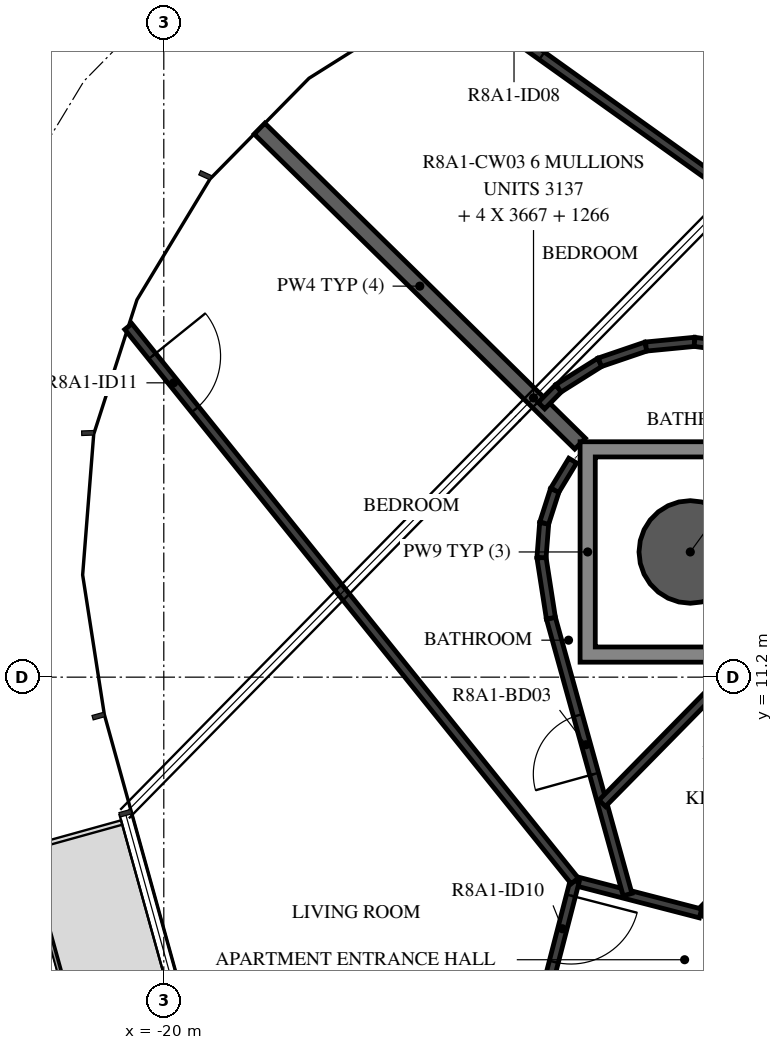
"""IFC4 building model, lengths in metres.
Left out: names, types, materials, properties, quantities, classifications, styles, units other than length and angle.
Written with IfcOpenShell. Run it as: python <this file> out.ifc"""

import sys

from ifc_helpers import new_model, si_unit, direction, frame, frame_2d, origin, origin_2d, place, context, subcontext, project, spatial, polyline, rectangle, hollow_circle, outline, extrude, element, fill, save


model = new_model("IFC4")
c1 = context("Model", 3, precision=1e-05, world=origin(), true_north=direction((0.0, 1.0)))
c2 = subcontext(c1, "Body", "Model", "MODEL_VIEW")
j1 = project(units=[si_unit("LENGTHUNIT", "METRE"), si_unit("PLANEANGLEUNIT", "RADIAN")], contexts=[c1])
p1 = place(None, origin())
s1 = spatial("IfcSite", under=j1, at=p1, CompositionType="ELEMENT")
p2 = place(p1, origin())
s2 = spatial("IfcBuilding", under=s1, at=p2, CompositionType="ELEMENT")
p3 = place(p2, frame((0.0, 0.0, 301.7)))
s3 = spatial("IfcBuildingStorey", under=s2, at=p3, CompositionType="ELEMENT", Elevation=301.7)
p4 = place(p3, frame((-13.073, 12.847, -0.38), z_axis=(0.0, 0.0, 1.0), x_axis=(1.0, 0.0, 0.0)))
e1 = element("IfcColumn", 1, at=p4, inside=s3, PredefinedType="COLUMN", context=c2, shape_type="SweptSolid", body=[
    extrude(hollow_circle(Radius=0.675, WallThickness=0.03, at=origin_2d()), origin(), (0.0, 0.0, 1.0), 3.5),
])
p5 = place(p3, frame((-18.741, 18.417, 0.0), z_axis=(0.0, 0.0, 1.0), x_axis=(0.713252414586, -0.700907264256, 0.0)))
e2 = element("IfcWall", 2, at=p5, inside=s3, PredefinedType="STANDARD", context=c2, shape_type="SweptSolid", body=[
    extrude(rectangle(XDim=5.913, YDim=0.2, at=frame_2d((2.957, 0.0))), origin(), (0.0, 0.0, 1.0), 3.12),
])
p6 = place(p3, frame((-7.974, 13.144, 0.0), z_axis=(0.0, 0.0, 1.0), x_axis=(-0.700910366085, -0.713249366432, 0.0)))
e3 = element("IfcWall", 3, at=p6, inside=s3, PredefinedType="PARTITIONING", context=c2, shape_type="SweptSolid", body=[
    extrude(rectangle(XDim=7.083, YDim=0.12, at=frame_2d((3.542, 0.0))), origin(), (0.0, 0.0, 1.0), 3.12),
])
p7 = place(p6, frame((3.986, 0.0, 0.0)))
e4 = element("IfcOpeningElement", 4, at=p7, cuts=e3, PredefinedType="OPENING", context=c2, shape_type="SweptSolid", body=[
    extrude(rectangle(XDim=0.9, YDim=2.1, at=frame_2d((0.45, 1.05))), frame((0.0, 0.07, 0.0), z_axis=(0.0, -1.0, 0.0), x_axis=(1.0, 0.0, 0.0)), (0.0, 0.0, 1.0), 0.14),
])
p8 = place(p3, frame((-16.165, 20.188, 0.0), z_axis=(0.0, 0.0, 1.0), x_axis=(0.813459166979, -0.581622028175, 0.0)))
e5 = element("IfcWall", 5, at=p8, inside=s3, PredefinedType="PARTITIONING", context=c2, shape_type="SweptSolid", body=[
    extrude(rectangle(XDim=9.565, YDim=0.12, at=frame_2d((4.782, 0.0))), origin(), (0.0, 0.0, 1.0), 3.12),
])
p9 = place(p8, frame((0.5, 0.0, 0.0)))
e6 = element("IfcOpeningElement", 6, at=p9, cuts=e5, PredefinedType="OPENING", context=c2, shape_type="SweptSolid", body=[
    extrude(rectangle(XDim=0.9, YDim=2.1, at=frame_2d((0.45, 1.05))), frame((0.0, 0.07, 0.0), z_axis=(0.0, -1.0, 0.0), x_axis=(1.0, 0.0, 0.0)), (0.0, 0.0, 1.0), 0.14),
])
p10 = place(p3, frame((-15.032, 14.772, 0.0), z_axis=(0.0, 0.0, 1.0), x_axis=(0.701378407906, 0.712789119532, 0.0)))
e7 = element("IfcWall", 7, at=p10, inside=s3, PredefinedType="PARTITIONING", context=c2, shape_type="SweptSolid", body=[
    extrude(rectangle(XDim=0.321, YDim=0.12, at=frame_2d((0.161, 0.0))), origin(), (0.0, 0.0, 1.0), 3.12),
])
p11 = place(p3, frame((-14.807, 15.0, 0.0), z_axis=(0.0, 0.0, 1.0), x_axis=(0.846499451836, 0.532389592349, 0.0)))
e8 = element("IfcWall", 8, at=p11, inside=s3, PredefinedType="PARTITIONING", context=c2, shape_type="SweptSolid", body=[
    extrude(rectangle(XDim=0.642, YDim=0.12, at=frame_2d((0.321, 0.0))), origin(), (0.0, 0.0, 1.0), 3.12),
])
for number, where, z_axis, x_axis in (
    (9, (-14.263, 15.342, 0.0), (0.0, 0.0, 1.0), (0.946, 0.323, 0.0)),
    (10, (-13.656, 15.55, 0.0), (0.0, 0.0, 1.0), (0.995, 0.096, 0.0)),
):
    element("IfcWall", number, at=place(p3, frame(where, z_axis=z_axis, x_axis=x_axis)), inside=s3, PredefinedType="PARTITIONING", context=c2, shape_type="SweptSolid", body=[
        extrude(rectangle(XDim=0.642, YDim=0.12, at=frame_2d((0.321, 0.0))), origin(), (0.0, 0.0, 1.0), 3.12),
    ])
p12 = place(p3, frame((-13.017, 15.611, 0.0), z_axis=(0.0, 0.0, 1.0), x_axis=(0.990688406717, -0.136148745119, 0.0)))
e11 = element("IfcWall", 11, at=p12, inside=s3, PredefinedType="PARTITIONING", context=c2, shape_type="SweptSolid", body=[
    extrude(rectangle(XDim=0.947, YDim=0.12, at=frame_2d((0.473, 0.0))), origin(), (0.0, 0.0, 1.0), 3.12),
])
p13 = place(p3, frame((-12.939, 8.092, 0.0), z_axis=(0.0, 0.0, 1.0), x_axis=(-0.968179141411, 0.250258166974, 0.0)))
e12 = element("IfcWall", 12, at=p13, inside=s3, PredefinedType="PARTITIONING", context=c2, shape_type="SweptSolid", body=[
    extrude(rectangle(XDim=1.709, YDim=0.12, at=frame_2d((0.854, 0.0))), origin(), (0.0, 0.0, 1.0), 3.12),
])
p14 = place(p3, frame((-14.594, 8.519, 0.0), z_axis=(0.0, 0.0, 1.0), x_axis=(-0.250468695288, -0.968124698931, 0.0)))
e13 = element("IfcWall", 13, at=p14, inside=s3, PredefinedType="PARTITIONING", context=c2, shape_type="SweptSolid", body=[
    extrude(rectangle(XDim=1.7, YDim=0.12, at=frame_2d((0.85, 0.0))), origin(), (0.0, 0.0, 1.0), 3.12),
])
p15 = place(p14, frame((0.2, 0.0, 0.0)))
e14 = element("IfcOpeningElement", 14, at=p15, cuts=e13, PredefinedType="OPENING", context=c2, shape_type="SweptSolid", body=[
    extrude(rectangle(XDim=0.9, YDim=2.1, at=frame_2d((0.45, 1.05))), frame((0.0, 0.07, 0.0), z_axis=(0.0, -1.0, 0.0), x_axis=(1.0, 0.0, 0.0)), (0.0, 0.0, 1.0), 0.14),
])
p16 = place(p3, frame((-13.899, 8.34, 0.0), z_axis=(0.0, 0.0, 1.0), x_axis=(-0.267286775597, 0.963617029525, 0.0)))
e15 = element("IfcWall", 15, at=p16, inside=s3, PredefinedType="PARTITIONING", context=c2, shape_type="SweptSolid", body=[
    extrude(rectangle(XDim=3.773, YDim=0.12, at=frame_2d((1.887, 0.0))), origin(), (0.0, 0.0, 1.0), 3.12),
])
p17 = place(p16, frame((1.646, 0.0, 0.0)))
e16 = element("IfcOpeningElement", 16, at=p17, cuts=e15, PredefinedType="OPENING", context=c2, shape_type="SweptSolid", body=[
    extrude(rectangle(XDim=0.8, YDim=2.1, at=frame_2d((0.4, 1.05))), frame((0.0, 0.07, 0.0), z_axis=(0.0, -1.0, 0.0), x_axis=(1.0, 0.0, 0.0)), (0.0, 0.0, 1.0), 0.14),
])
p18 = place(p3, frame((-14.907, 11.976, 0.0), z_axis=(0.0, 0.0, 1.0), x_axis=(-0.153398456533, 0.988164416245, 0.0)))
e17 = element("IfcWall", 17, at=p18, inside=s3, PredefinedType="PARTITIONING", context=c2, shape_type="SweptSolid", body=[
    extrude(rectangle(XDim=0.807, YDim=0.12, at=frame_2d((0.403, 0.0))), origin(), (0.0, 0.0, 1.0), 3.12),
])
for number, where, z_axis, x_axis in (
    (18, (-15.031, 12.773, 0.0), (0.0, 0.0, 1.0), (0.078, 0.997, 0.0)),
    (19, (-14.995, 13.227, 0.0), (0.0, 0.0, 1.0), (0.306, 0.952, 0.0)),
    (20, (-14.856, 13.66, 0.0), (0.0, 0.0, 1.0), (0.518, 0.855, 0.0)),
):
    element("IfcWall", number, at=place(p3, frame(where, z_axis=z_axis, x_axis=x_axis)), inside=s3, PredefinedType="PARTITIONING", context=c2, shape_type="SweptSolid", body=[
        extrude(rectangle(XDim=0.455, YDim=0.12, at=frame_2d((0.228, 0.0))), origin(), (0.0, 0.0, 1.0), 3.12),
    ])
p19 = place(p3, frame((-20.466, 15.812, 0.0), z_axis=(0.0, 0.0, 1.0), x_axis=(0.62719424473, -0.77886287585, 0.0)))
e21 = element("IfcWall", 21, at=p19, inside=s3, PredefinedType="PARTITIONING", context=c2, shape_type="SweptSolid", body=[
    extrude(rectangle(XDim=9.364, YDim=0.12, at=frame_2d((4.682, 0.0))), origin(), (0.0, 0.0, 1.0), 3.12),
])
p20 = place(p19, frame((0.5, 0.0, 0.0)))
e22 = element("IfcOpeningElement", 22, at=p20, cuts=e21, PredefinedType="OPENING", context=c2, shape_type="SweptSolid", body=[
    extrude(rectangle(XDim=0.9, YDim=2.1, at=frame_2d((0.45, 1.05))), frame((0.0, 0.07, 0.0), z_axis=(0.0, -1.0, 0.0), x_axis=(1.0, 0.0, 0.0)), (0.0, 0.0, 1.0), 0.14),
])
p21 = place(p3, frame((-14.232, 9.54, 0.0), z_axis=(0.0, 0.0, 1.0), x_axis=(0.700890401548, 0.713268985038, 0.0)))
e23 = element("IfcWall", 23, at=p21, inside=s3, PredefinedType="PARTITIONING", context=c2, shape_type="SweptSolid", body=[
    extrude(rectangle(XDim=2.604, YDim=0.12, at=frame_2d((1.302, 0.0))), origin(), (0.0, 0.0, 1.0), 3.12),
])
p22 = place(p3, origin())
e24 = element("IfcWall", 24, at=p22, inside=s3, PredefinedType="STANDARD", context=c2, shape_type="SweptSolid", body=[
    extrude(outline(polyline([(-11.623, 14.297), (-11.623, 11.397), (-14.523, 11.397), (-14.523, 14.297), (-11.623, 14.297)]), holes=[polyline([(-14.323, 11.597), (-11.823, 11.597), (-11.823, 14.097), (-14.323, 14.097), (-14.323, 11.597)])]), origin(), (0.0, 0.0, 1.0), 3.12),
])
p23 = place(p9, origin())
e25 = element("IfcDoor", 25, at=p23, inside=s3, OperationType="SINGLE_SWING_RIGHT", PredefinedType="DOOR", context=c2, shape_type="SweptSolid", body=[
    extrude(rectangle(XDim=0.9, YDim=2.1, at=frame_2d((0.45, 1.05))), frame((0.0, 0.025, 0.0), z_axis=(0.0, -1.0, 0.0), x_axis=(1.0, 0.0, 0.0)), (0.0, 0.0, 1.0), 0.05),
])
fill(e6, e25)
p24 = place(p15, origin())
e26 = element("IfcDoor", 26, at=p24, inside=s3, OperationType="SINGLE_SWING_LEFT", PredefinedType="DOOR", context=c2, shape_type="SweptSolid", body=[
    extrude(rectangle(XDim=0.9, YDim=2.1, at=frame_2d((0.45, 1.05))), frame((0.0, 0.025, 0.0), z_axis=(0.0, -1.0, 0.0), x_axis=(1.0, 0.0, 0.0)), (0.0, 0.0, 1.0), 0.05),
])
fill(e14, e26)
p25 = place(p20, origin())
e27 = element("IfcDoor", 27, at=p25, inside=s3, OperationType="SINGLE_SWING_LEFT", PredefinedType="DOOR", context=c2, shape_type="SweptSolid", body=[
    extrude(rectangle(XDim=0.9, YDim=2.1, at=frame_2d((0.45, 1.05))), frame((0.0, 0.025, 0.0), z_axis=(0.0, -1.0, 0.0), x_axis=(1.0, 0.0, 0.0)), (0.0, 0.0, 1.0), 0.05),
])
fill(e22, e27)
p26 = place(p17, origin())
e28 = element("IfcDoor", 28, at=p26, inside=s3, OperationType="SINGLE_SWING_RIGHT", PredefinedType="DOOR", context=c2, shape_type="SweptSolid", body=[
    extrude(rectangle(XDim=0.8, YDim=2.1, at=frame_2d((0.4, 1.05))), frame((0.0, 0.025, 0.0), z_axis=(0.0, -1.0, 0.0), x_axis=(1.0, 0.0, 0.0)), (0.0, 0.0, 1.0), 0.05),
])
fill(e16, e28)
save(model, sys.argv[1])
